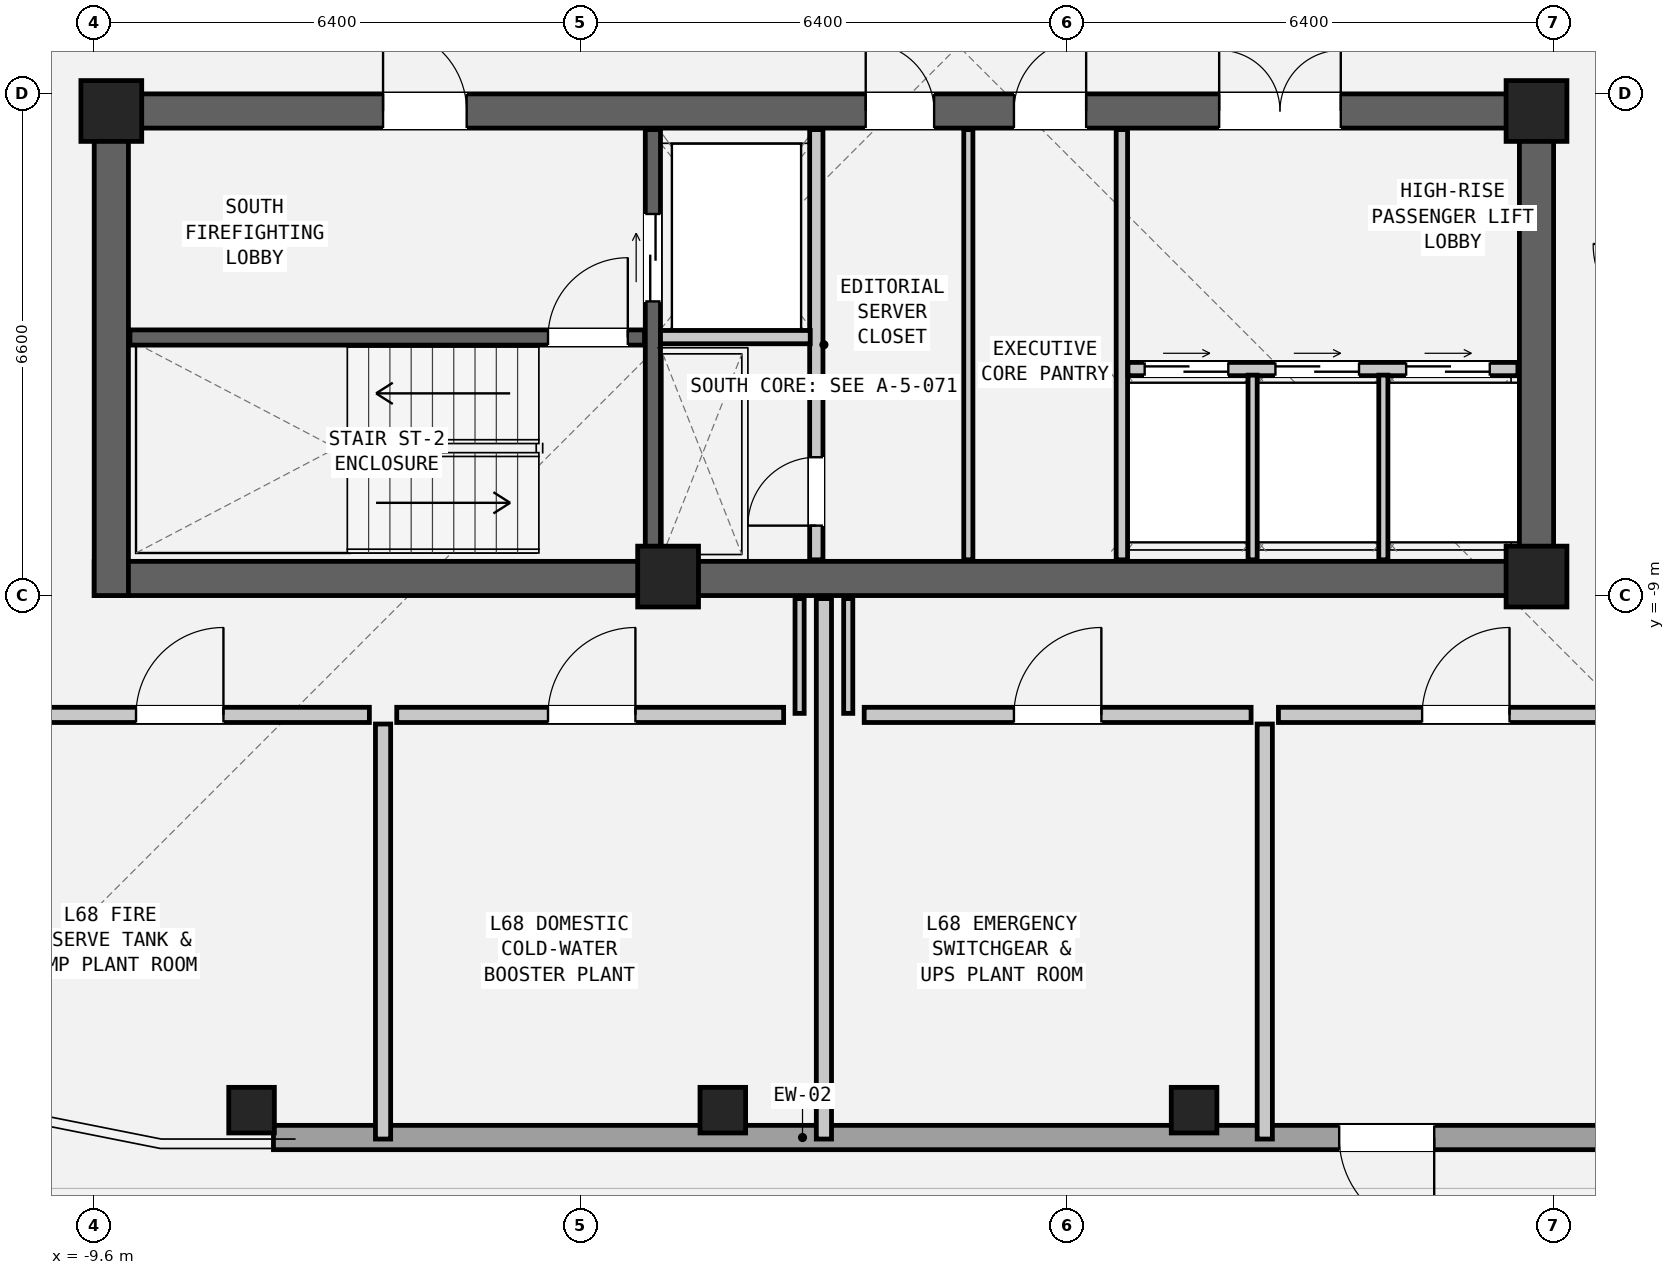
"""IFC4 building model, lengths in metres.
Left out: names, types, materials, properties, quantities, classifications, styles, units other than length and angle.
Written with IfcOpenShell. Run it as: python <this file> out.ifc"""

import sys

from ifc_helpers import new_model, si_unit, direction, frame, frame_2d, origin, origin_2d, place, context, subcontext, project, spatial, rectangle, hollow_rectangle, extrude, element, fill, save


model = new_model("IFC4")
c1 = context("Model", 3, precision=1e-05, world=origin(), true_north=direction((0.0, 1.0)))
c2 = subcontext(c1, "Body", "Model", "MODEL_VIEW")
j1 = project(units=[si_unit("LENGTHUNIT", "METRE"), si_unit("PLANEANGLEUNIT", "RADIAN")], contexts=[c1])
p1 = place(None, origin())
s1 = spatial("IfcSite", under=j1, at=p1, CompositionType="ELEMENT")
p2 = place(p1, origin())
s2 = spatial("IfcBuilding", under=s1, at=p2, CompositionType="ELEMENT")
p3 = place(p2, frame((0.0, 0.0, 231.3)))
s3 = spatial("IfcBuildingStorey", under=s2, at=p3, CompositionType="ELEMENT", Elevation=231.3)
p4 = place(p3, frame((-9.6, -8.775, 0.0), z_axis=(0.0, 0.0, 1.0), x_axis=(1.0, 0.0, 0.0)))
e1 = element("IfcWall", 1, at=p4, inside=s3, PredefinedType="SHEAR", context=c2, shape_type="SweptSolid", body=[
    extrude(rectangle(XDim=19.2, YDim=0.45, at=frame_2d((9.6, 0.0))), origin(), (0.0, 0.0, 1.0), 3.6),
])
p5 = place(p3, frame((-9.6, -2.625, 0.0), z_axis=(0.0, 0.0, 1.0), x_axis=(1.0, 0.0, 0.0)))
e2 = element("IfcWall", 2, at=p5, inside=s3, PredefinedType="SHEAR", context=c2, shape_type="SweptSolid", body=[
    extrude(rectangle(XDim=19.2, YDim=0.45, at=frame_2d((9.6, 0.0))), origin(), (0.0, 0.0, 1.0), 3.6),
])
p6 = place(p5, frame((3.8, 0.0, 0.0)))
e3 = element("IfcOpeningElement", 3, at=p6, cuts=e2, PredefinedType="OPENING", context=c2, shape_type="SweptSolid", body=[
    extrude(rectangle(XDim=1.1, YDim=2.08, at=frame_2d((0.55, 1.04))), frame((0.0, 0.237, 0.0), z_axis=(0.0, -1.0, 0.0), x_axis=(1.0, 0.0, 0.0)), (0.0, 0.0, 1.0), 0.474),
])
p7 = place(p5, frame((10.15, 0.0, 0.0)))
e4 = element("IfcOpeningElement", 4, at=p7, cuts=e2, PredefinedType="OPENING", context=c2, shape_type="SweptSolid", body=[
    extrude(rectangle(XDim=0.9, YDim=2.05, at=frame_2d((0.45, 1.025))), frame((0.0, 0.237, 0.0), z_axis=(0.0, -1.0, 0.0), x_axis=(1.0, 0.0, 0.0)), (0.0, 0.0, 1.0), 0.474),
])
p8 = place(p5, frame((12.1, 0.0, 0.0)))
e5 = element("IfcOpeningElement", 5, at=p8, cuts=e2, PredefinedType="OPENING", context=c2, shape_type="SweptSolid", body=[
    extrude(rectangle(XDim=0.95, YDim=2.1, at=frame_2d((0.475, 1.05))), frame((0.0, 0.237, 0.0), z_axis=(0.0, -1.0, 0.0), x_axis=(1.0, 0.0, 0.0)), (0.0, 0.0, 1.0), 0.474),
])
p9 = place(p5, frame((14.8, 0.0, 0.0)))
e6 = element("IfcOpeningElement", 6, at=p9, cuts=e2, PredefinedType="OPENING", context=c2, shape_type="SweptSolid", body=[
    extrude(rectangle(XDim=1.6, YDim=2.12, at=frame_2d((0.8, 1.06))), frame((0.0, 0.237, 0.0), z_axis=(0.0, -1.0, 0.0), x_axis=(1.0, 0.0, 0.0)), (0.0, 0.0, 1.0), 0.474),
])
for number, where, z_axis, x_axis in (
    (7, (-9.375, -9.0, 0.0), (0.0, 0.0, 1.0), (0.0, 1.0, 0.0)),
    (8, (9.375, -9.0, 0.0), (0.0, 0.0, 1.0), (0.0, 1.0, 0.0)),
):
    element("IfcWall", number, at=place(p3, frame(where, z_axis=z_axis, x_axis=x_axis)), inside=s3, PredefinedType="SHEAR", context=c2, shape_type="SweptSolid", body=[
        extrude(rectangle(XDim=6.6, YDim=0.45, at=frame_2d((3.3, 0.0))), origin(), (0.0, 0.0, 1.0), 3.6),
    ])
for number, where, z_axis, x_axis in (
    (9, (-7.53, -15.77, 0.0), (0.0, 0.0, 1.0), (1.0, 0.0, 0.0)),
    (10, (-1.33, -15.77, 0.0), (0.0, 0.0, 1.0), (1.0, 0.0, 0.0)),
    (11, (4.87, -15.77, 0.0), (0.0, 0.0, 1.0), (1.0, 0.0, 0.0)),
):
    element("IfcColumn", number, at=place(p3, frame(where, z_axis=z_axis, x_axis=x_axis)), inside=s3, PredefinedType="COLUMN", context=c2, shape_type="SweptSolid", body=[
        extrude(hollow_rectangle(XDim=0.6, YDim=0.6, WallThickness=0.04, at=origin_2d()), origin(), (0.0, 0.0, 1.0), 3.6),
    ])
for number, where, z_axis, x_axis in (
    (12, (-9.375, -2.625, 0.0), (0.0, 0.0, 1.0), (1.0, 0.0, 0.0)),
    (13, (9.375, -2.625, 0.0), (0.0, 0.0, 1.0), (1.0, 0.0, 0.0)),
    (14, (-2.05, -8.75, 0.0), (0.0, 0.0, 1.0), (1.0, 0.0, 0.0)),
    (15, (9.375, -8.75, 0.0), (0.0, 0.0, 1.0), (1.0, 0.0, 0.0)),
):
    element("IfcColumn", number, at=place(p3, frame(where, z_axis=z_axis, x_axis=x_axis)), inside=s3, PredefinedType="COLUMN", context=c2, shape_type="SweptSolid", body=[
        extrude(rectangle(XDim=0.8, YDim=0.8, at=origin_2d()), origin(), (0.0, 0.0, 1.0), 3.6),
    ])
p10 = place(p3, frame((10.782, -16.13, 0.0), z_axis=(0.0, 0.0, 1.0), x_axis=(-1.0, 0.0, 0.0)))
e16 = element("IfcWall", 16, at=p10, inside=s3, PredefinedType="SOLIDWALL", context=c2, shape_type="SweptSolid", body=[
    extrude(rectangle(XDim=18.024, YDim=0.32, at=frame_2d((9.012, 0.0))), origin(), (0.0, 0.0, 1.0), 2.182),
])
p11 = place(p10, frame((2.753, 0.0, 0.0)))
e17 = element("IfcOpeningElement", 17, at=p11, cuts=e16, PredefinedType="OPENING", context=c2, shape_type="SweptSolid", body=[
    extrude(rectangle(XDim=1.25, YDim=2.02, at=frame_2d((0.625, 1.01))), frame((0.0, 0.172, 0.0), z_axis=(0.0, -1.0, 0.0), x_axis=(1.0, 0.0, 0.0)), (0.0, 0.0, 1.0), 0.344),
])
p12 = place(p3, frame((-9.13, -5.605, 0.0), z_axis=(0.0, 0.0, 1.0), x_axis=(1.0, 0.0, 0.0)))
e18 = element("IfcWall", 18, at=p12, inside=s3, PredefinedType="SHEAR", context=c2, shape_type="SweptSolid", body=[
    extrude(rectangle(XDim=6.77, YDim=0.2, at=frame_2d((3.385, 0.0))), origin(), (0.0, 0.0, 1.0), 3.32),
])
p13 = place(p12, frame((5.5, 0.0, 0.0)))
e19 = element("IfcOpeningElement", 19, at=p13, cuts=e18, PredefinedType="OPENING", context=c2, shape_type="SweptSolid", body=[
    extrude(rectangle(XDim=1.05, YDim=2.08, at=frame_2d((0.525, 1.04))), frame((0.0, 0.112, 0.0), z_axis=(0.0, -1.0, 0.0), x_axis=(1.0, 0.0, 0.0)), (0.0, 0.0, 1.0), 0.224),
])
p14 = place(p3, frame((-2.25, -8.53, 0.0), z_axis=(0.0, 0.0, 1.0), x_axis=(0.0, 1.0, 0.0)))
e20 = element("IfcWall", 20, at=p14, inside=s3, PredefinedType="SHEAR", context=c2, shape_type="SweptSolid", body=[
    extrude(rectangle(XDim=5.66, YDim=0.2, at=frame_2d((2.83, 0.0))), origin(), (0.0, 0.0, 1.0), 3.32),
])
p15 = place(p14, frame((3.4, 0.0, 0.0)))
e21 = element("IfcOpeningElement", 21, at=p15, cuts=e20, PredefinedType="OPENING", context=c2, shape_type="SweptSolid", body=[
    extrude(rectangle(XDim=1.15, YDim=2.08, at=frame_2d((0.575, 1.04))), frame((0.0, 0.112, 0.0), z_axis=(0.0, -1.0, 0.0), x_axis=(1.0, 0.0, 0.0)), (0.0, 0.0, 1.0), 0.224),
])
p16 = place(p3, frame((-0.1, -8.53, 0.0), z_axis=(0.0, 0.0, 1.0), x_axis=(0.0, 1.0, 0.0)))
e22 = element("IfcWall", 22, at=p16, inside=s3, PredefinedType="PARTITIONING", context=c2, shape_type="SweptSolid", body=[
    extrude(rectangle(XDim=5.66, YDim=0.175, at=frame_2d((2.83, 0.0))), origin(), (0.0, 0.0, 1.0), 3.32),
])
p17 = place(p16, frame((0.45, 0.0, 0.0)))
e23 = element("IfcOpeningElement", 23, at=p17, cuts=e22, PredefinedType="OPENING", context=c2, shape_type="SweptSolid", body=[
    extrude(rectangle(XDim=0.9, YDim=2.05, at=frame_2d((0.45, 1.025))), frame((0.0, 0.1, 0.0), z_axis=(0.0, -1.0, 0.0), x_axis=(1.0, 0.0, 0.0)), (0.0, 0.0, 1.0), 0.199),
])
p18 = place(p3, frame((-2.15, -5.6, 0.0), z_axis=(0.0, 0.0, 1.0), x_axis=(1.0, 0.0, 0.0)))
e24 = element("IfcWall", 24, at=p18, inside=s3, PredefinedType="PARTITIONING", context=c2, shape_type="SweptSolid", body=[
    extrude(rectangle(XDim=1.97, YDim=0.175, at=frame_2d((0.985, 0.0))), origin(), (0.0, 0.0, 1.0), 3.32),
])
p19 = place(p3, frame((3.92, -8.53, 0.0), z_axis=(0.0, 0.0, 1.0), x_axis=(0.0, 1.0, 0.0)))
e25 = element("IfcWall", 25, at=p19, inside=s3, PredefinedType="PARTITIONING", context=c2, shape_type="SweptSolid", body=[
    extrude(rectangle(XDim=5.66, YDim=0.15, at=frame_2d((2.83, 0.0))), origin(), (0.0, 0.0, 1.0), 3.32),
])
p20 = place(p3, frame((1.9, -8.53, 0.0), z_axis=(0.0, 0.0, 1.0), x_axis=(0.0, 1.0, 0.0)))
e26 = element("IfcWall", 26, at=p20, inside=s3, PredefinedType="PARTITIONING", context=c2, shape_type="SweptSolid", body=[
    extrude(rectangle(XDim=5.66, YDim=0.12, at=frame_2d((2.83, 0.0))), origin(), (0.0, 0.0, 1.0), 3.32),
])
p21 = place(p3, frame((4.0, -6.02, 0.0), z_axis=(0.0, 0.0, 1.0), x_axis=(1.0, 0.0, 0.0)))
e27 = element("IfcWall", 27, at=p21, inside=s3, PredefinedType="PARTITIONING", context=c2, shape_type="SweptSolid", body=[
    extrude(rectangle(XDim=5.13, YDim=0.175, at=frame_2d((2.565, 0.0))), origin(), (0.0, 0.0, 1.0), 3.32),
])
p22 = place(p21, frame((0.22, 0.0, 0.0)))
e28 = element("IfcOpeningElement", 28, at=p22, cuts=e27, PredefinedType="OPENING", context=c2, shape_type="SweptSolid", body=[
    extrude(rectangle(XDim=1.1, YDim=2.06, at=frame_2d((0.55, 1.03))), frame((0.0, 0.1, 0.0), z_axis=(0.0, -1.0, 0.0), x_axis=(1.0, 0.0, 0.0)), (0.0, 0.0, 1.0), 0.199),
])
p23 = place(p21, frame((1.94, 0.0, 0.0)))
e29 = element("IfcOpeningElement", 29, at=p23, cuts=e27, PredefinedType="OPENING", context=c2, shape_type="SweptSolid", body=[
    extrude(rectangle(XDim=1.1, YDim=2.06, at=frame_2d((0.55, 1.03))), frame((0.0, 0.1, 0.0), z_axis=(0.0, -1.0, 0.0), x_axis=(1.0, 0.0, 0.0)), (0.0, 0.0, 1.0), 0.199),
])
p24 = place(p21, frame((3.66, 0.0, 0.0)))
e30 = element("IfcOpeningElement", 30, at=p24, cuts=e27, PredefinedType="OPENING", context=c2, shape_type="SweptSolid", body=[
    extrude(rectangle(XDim=1.1, YDim=2.06, at=frame_2d((0.55, 1.03))), frame((0.0, 0.1, 0.0), z_axis=(0.0, -1.0, 0.0), x_axis=(1.0, 0.0, 0.0)), (0.0, 0.0, 1.0), 0.199),
])
for number, where, z_axis, x_axis in (
    (31, (5.64, -8.53, 0.0), (0.0, 0.0, 1.0), (0.0, 1.0, 0.0)),
    (32, (7.36, -8.53, 0.0), (0.0, 0.0, 1.0), (0.0, 1.0, 0.0)),
):
    element("IfcWall", number, at=place(p3, frame(where, z_axis=z_axis, x_axis=x_axis)), inside=s3, PredefinedType="PARTITIONING", context=c2, shape_type="SweptSolid", body=[
        extrude(rectangle(XDim=2.43, YDim=0.12, at=frame_2d((1.215, 0.0))), origin(), (0.0, 0.0, 1.0), 3.32),
    ])
p25 = place(p3, frame((0.0, -16.15, 0.0), z_axis=(0.0, 0.0, 1.0), x_axis=(0.0, 1.0, 0.0)))
e33 = element("IfcWall", 33, at=p25, inside=s3, PredefinedType="PARTITIONING", context=c2, shape_type="SweptSolid", body=[
    extrude(rectangle(XDim=7.11, YDim=0.2, at=frame_2d((3.555, 0.0))), origin(), (0.0, 0.0, 1.0), 2.538),
])
for number, where, z_axis, x_axis in (
    (34, (-0.32, -10.55, 0.0), (0.0, 0.0, 1.0), (0.0, 1.0, 0.0)),
    (35, (0.32, -10.55, 0.0), (0.0, 0.0, 1.0), (0.0, 1.0, 0.0)),
):
    element("IfcWall", number, at=place(p3, frame(where, z_axis=z_axis, x_axis=x_axis)), inside=s3, PredefinedType="PARTITIONING", context=c2, shape_type="SweptSolid", body=[
        extrude(rectangle(XDim=1.51, YDim=0.12, at=frame_2d((0.755, 0.0))), origin(), (0.0, 0.0, 1.0), 2.538),
    ])
p26 = place(p3, frame((-10.97, -10.57, 0.0), z_axis=(0.0, 0.0, 1.0), x_axis=(1.0, 0.0, 0.0)))
e36 = element("IfcWall", 36, at=p26, inside=s3, PredefinedType="PARTITIONING", context=c2, shape_type="SweptSolid", body=[
    extrude(rectangle(XDim=4.99, YDim=0.2, at=frame_2d((2.495, 0.0))), origin(), (0.0, 0.0, 1.0), 3.32),
])
p27 = place(p26, frame((1.92, 0.0, 0.0)))
e37 = element("IfcOpeningElement", 37, at=p27, cuts=e36, PredefinedType="OPENING", context=c2, shape_type="SweptSolid", body=[
    extrude(rectangle(XDim=1.15, YDim=2.1, at=frame_2d((0.575, 1.05))), frame((0.0, 0.112, 0.0), z_axis=(0.0, -1.0, 0.0), x_axis=(1.0, 0.0, 0.0)), (0.0, 0.0, 1.0), 0.224),
])
p28 = place(p3, frame((-5.8, -16.15, 0.0), z_axis=(0.0, 0.0, 1.0), x_axis=(0.0, 1.0, 0.0)))
e38 = element("IfcWall", 38, at=p28, inside=s3, PredefinedType="PARTITIONING", context=c2, shape_type="SweptSolid", body=[
    extrude(rectangle(XDim=5.46, YDim=0.2, at=frame_2d((2.73, 0.0))), origin(), (0.0, 0.0, 1.0), 2.538),
])
p29 = place(p3, frame((-5.62, -10.57, 0.0), z_axis=(0.0, 0.0, 1.0), x_axis=(1.0, 0.0, 0.0)))
e39 = element("IfcWall", 39, at=p29, inside=s3, PredefinedType="PARTITIONING", context=c2, shape_type="SweptSolid", body=[
    extrude(rectangle(XDim=5.09, YDim=0.2, at=frame_2d((2.545, 0.0))), origin(), (0.0, 0.0, 1.0), 3.32),
])
p30 = place(p29, frame((1.99, 0.0, 0.0)))
e40 = element("IfcOpeningElement", 40, at=p30, cuts=e39, PredefinedType="OPENING", context=c2, shape_type="SweptSolid", body=[
    extrude(rectangle(XDim=1.15, YDim=2.1, at=frame_2d((0.575, 1.05))), frame((0.0, 0.112, 0.0), z_axis=(0.0, -1.0, 0.0), x_axis=(1.0, 0.0, 0.0)), (0.0, 0.0, 1.0), 0.224),
])
p31 = place(p3, frame((0.53, -10.57, 0.0), z_axis=(0.0, 0.0, 1.0), x_axis=(1.0, 0.0, 0.0)))
e41 = element("IfcWall", 41, at=p31, inside=s3, PredefinedType="PARTITIONING", context=c2, shape_type="SweptSolid", body=[
    extrude(rectangle(XDim=5.09, YDim=0.2, at=frame_2d((2.545, 0.0))), origin(), (0.0, 0.0, 1.0), 3.32),
])
p32 = place(p31, frame((1.97, 0.0, 0.0)))
e42 = element("IfcOpeningElement", 42, at=p32, cuts=e41, PredefinedType="OPENING", context=c2, shape_type="SweptSolid", body=[
    extrude(rectangle(XDim=1.15, YDim=2.1, at=frame_2d((0.575, 1.05))), frame((0.0, 0.112, 0.0), z_axis=(0.0, -1.0, 0.0), x_axis=(1.0, 0.0, 0.0)), (0.0, 0.0, 1.0), 0.224),
])
p33 = place(p3, frame((5.8, -16.15, 0.0), z_axis=(0.0, 0.0, 1.0), x_axis=(0.0, 1.0, 0.0)))
e43 = element("IfcWall", 43, at=p33, inside=s3, PredefinedType="PARTITIONING", context=c2, shape_type="SweptSolid", body=[
    extrude(rectangle(XDim=5.46, YDim=0.2, at=frame_2d((2.73, 0.0))), origin(), (0.0, 0.0, 1.0), 2.538),
])
p34 = place(p3, frame((5.98, -10.57, 0.0), z_axis=(0.0, 0.0, 1.0), x_axis=(1.0, 0.0, 0.0)))
e44 = element("IfcWall", 44, at=p34, inside=s3, PredefinedType="PARTITIONING", context=c2, shape_type="SweptSolid", body=[
    extrude(rectangle(XDim=4.99, YDim=0.2, at=frame_2d((2.495, 0.0))), origin(), (0.0, 0.0, 1.0), 3.32),
])
p35 = place(p34, frame((1.89, 0.0, 0.0)))
e45 = element("IfcOpeningElement", 45, at=p35, cuts=e44, PredefinedType="OPENING", context=c2, shape_type="SweptSolid", body=[
    extrude(rectangle(XDim=1.15, YDim=2.1, at=frame_2d((0.575, 1.05))), frame((0.0, 0.112, 0.0), z_axis=(0.0, -1.0, 0.0), x_axis=(1.0, 0.0, 0.0)), (0.0, 0.0, 1.0), 0.224),
])
p36 = place(p11, origin())
e46 = element("IfcDoor", 46, at=p36, inside=s3, OperationType="SINGLE_SWING_LEFT", PredefinedType="DOOR", context=c2, shape_type="SweptSolid", body=[
    extrude(rectangle(XDim=1.25, YDim=2.02, at=frame_2d((0.625, 1.01))), frame((0.0, 0.025, 0.0), z_axis=(0.0, -1.0, 0.0), x_axis=(1.0, 0.0, 0.0)), (0.0, 0.0, 1.0), 0.05),
])
fill(e17, e46)
p37 = place(p13, origin())
e47 = element("IfcDoor", 47, at=p37, inside=s3, OperationType="SINGLE_SWING_RIGHT", PredefinedType="DOOR", context=c2, shape_type="SweptSolid", body=[
    extrude(rectangle(XDim=1.05, YDim=2.08, at=frame_2d((0.525, 1.04))), frame((0.0, 0.025, 0.0), z_axis=(0.0, -1.0, 0.0), x_axis=(1.0, 0.0, 0.0)), (0.0, 0.0, 1.0), 0.05),
])
fill(e19, e47)
p38 = place(p6, origin())
e48 = element("IfcDoor", 48, at=p38, inside=s3, OperationType="SINGLE_SWING_LEFT", PredefinedType="DOOR", context=c2, shape_type="SweptSolid", body=[
    extrude(rectangle(XDim=1.1, YDim=2.08, at=frame_2d((0.55, 1.04))), frame((0.0, 0.025, 0.0), z_axis=(0.0, -1.0, 0.0), x_axis=(1.0, 0.0, 0.0)), (0.0, 0.0, 1.0), 0.05),
])
fill(e3, e48)
p39 = place(p15, origin())
e49 = element("IfcDoor", 49, at=p39, inside=s3, OperationType="DOUBLE_DOOR_SLIDING", PredefinedType="DOOR", context=c2, shape_type="SweptSolid", body=[
    extrude(rectangle(XDim=1.15, YDim=2.08, at=frame_2d((0.575, 1.04))), frame((0.0, 0.025, 0.0), z_axis=(0.0, -1.0, 0.0), x_axis=(1.0, 0.0, 0.0)), (0.0, 0.0, 1.0), 0.05),
])
fill(e21, e49)
p40 = place(p17, origin())
e50 = element("IfcDoor", 50, at=p40, inside=s3, OperationType="SINGLE_SWING_LEFT", PredefinedType="DOOR", context=c2, shape_type="SweptSolid", body=[
    extrude(rectangle(XDim=0.9, YDim=2.05, at=frame_2d((0.45, 1.025))), frame((0.0, 0.025, 0.0), z_axis=(0.0, -1.0, 0.0), x_axis=(1.0, 0.0, 0.0)), (0.0, 0.0, 1.0), 0.05),
])
fill(e23, e50)
p41 = place(p7, origin())
e51 = element("IfcDoor", 51, at=p41, inside=s3, OperationType="SINGLE_SWING_LEFT", PredefinedType="DOOR", context=c2, shape_type="SweptSolid", body=[
    extrude(rectangle(XDim=0.9, YDim=2.05, at=frame_2d((0.45, 1.025))), frame((0.0, 0.025, 0.0), z_axis=(0.0, -1.0, 0.0), x_axis=(1.0, 0.0, 0.0)), (0.0, 0.0, 1.0), 0.05),
])
fill(e4, e51)
p42 = place(p8, origin())
e52 = element("IfcDoor", 52, at=p42, inside=s3, OperationType="SINGLE_SWING_RIGHT", PredefinedType="DOOR", context=c2, shape_type="SweptSolid", body=[
    extrude(rectangle(XDim=0.95, YDim=2.1, at=frame_2d((0.475, 1.05))), frame((0.0, 0.025, 0.0), z_axis=(0.0, -1.0, 0.0), x_axis=(1.0, 0.0, 0.0)), (0.0, 0.0, 1.0), 0.05),
])
fill(e5, e52)
p43 = place(p22, origin())
e53 = element("IfcDoor", 53, at=p43, inside=s3, OperationType="DOUBLE_DOOR_SLIDING", PredefinedType="DOOR", context=c2, shape_type="SweptSolid", body=[
    extrude(rectangle(XDim=1.1, YDim=2.06, at=frame_2d((0.55, 1.03))), frame((0.0, 0.025, 0.0), z_axis=(0.0, -1.0, 0.0), x_axis=(1.0, 0.0, 0.0)), (0.0, 0.0, 1.0), 0.05),
])
fill(e28, e53)
p44 = place(p23, origin())
e54 = element("IfcDoor", 54, at=p44, inside=s3, OperationType="DOUBLE_DOOR_SLIDING", PredefinedType="DOOR", context=c2, shape_type="SweptSolid", body=[
    extrude(rectangle(XDim=1.1, YDim=2.06, at=frame_2d((0.55, 1.03))), frame((0.0, 0.025, 0.0), z_axis=(0.0, -1.0, 0.0), x_axis=(1.0, 0.0, 0.0)), (0.0, 0.0, 1.0), 0.05),
])
fill(e29, e54)
p45 = place(p24, origin())
e55 = element("IfcDoor", 55, at=p45, inside=s3, OperationType="DOUBLE_DOOR_SLIDING", PredefinedType="DOOR", context=c2, shape_type="SweptSolid", body=[
    extrude(rectangle(XDim=1.1, YDim=2.06, at=frame_2d((0.55, 1.03))), frame((0.0, 0.025, 0.0), z_axis=(0.0, -1.0, 0.0), x_axis=(1.0, 0.0, 0.0)), (0.0, 0.0, 1.0), 0.05),
])
fill(e30, e55)
p46 = place(p9, origin())
e56 = element("IfcDoor", 56, at=p46, inside=s3, OperationType="DOUBLE_DOOR_SINGLE_SWING", PredefinedType="DOOR", context=c2, shape_type="SweptSolid", body=[
    extrude(rectangle(XDim=1.6, YDim=2.12, at=frame_2d((0.8, 1.06))), frame((0.0, 0.025, 0.0), z_axis=(0.0, -1.0, 0.0), x_axis=(1.0, 0.0, 0.0)), (0.0, 0.0, 1.0), 0.05),
])
fill(e6, e56)
p47 = place(p27, origin())
e57 = element("IfcDoor", 57, at=p47, inside=s3, OperationType="SINGLE_SWING_RIGHT", PredefinedType="DOOR", context=c2, shape_type="SweptSolid", body=[
    extrude(rectangle(XDim=1.15, YDim=2.1, at=frame_2d((0.575, 1.05))), frame((0.0, 0.025, 0.0), z_axis=(0.0, -1.0, 0.0), x_axis=(1.0, 0.0, 0.0)), (0.0, 0.0, 1.0), 0.05),
])
fill(e37, e57)
p48 = place(p30, origin())
e58 = element("IfcDoor", 58, at=p48, inside=s3, OperationType="SINGLE_SWING_RIGHT", PredefinedType="DOOR", context=c2, shape_type="SweptSolid", body=[
    extrude(rectangle(XDim=1.15, YDim=2.1, at=frame_2d((0.575, 1.05))), frame((0.0, 0.025, 0.0), z_axis=(0.0, -1.0, 0.0), x_axis=(1.0, 0.0, 0.0)), (0.0, 0.0, 1.0), 0.05),
])
fill(e40, e58)
p49 = place(p32, origin())
e59 = element("IfcDoor", 59, at=p49, inside=s3, OperationType="SINGLE_SWING_RIGHT", PredefinedType="DOOR", context=c2, shape_type="SweptSolid", body=[
    extrude(rectangle(XDim=1.15, YDim=2.1, at=frame_2d((0.575, 1.05))), frame((0.0, 0.025, 0.0), z_axis=(0.0, -1.0, 0.0), x_axis=(1.0, 0.0, 0.0)), (0.0, 0.0, 1.0), 0.05),
])
fill(e42, e59)
p50 = place(p35, origin())
e60 = element("IfcDoor", 60, at=p50, inside=s3, OperationType="SINGLE_SWING_RIGHT", PredefinedType="DOOR", context=c2, shape_type="SweptSolid", body=[
    extrude(rectangle(XDim=1.15, YDim=2.1, at=frame_2d((0.575, 1.05))), frame((0.0, 0.025, 0.0), z_axis=(0.0, -1.0, 0.0), x_axis=(1.0, 0.0, 0.0)), (0.0, 0.0, 1.0), 0.05),
])
fill(e45, e60)
save(model, sys.argv[1])
